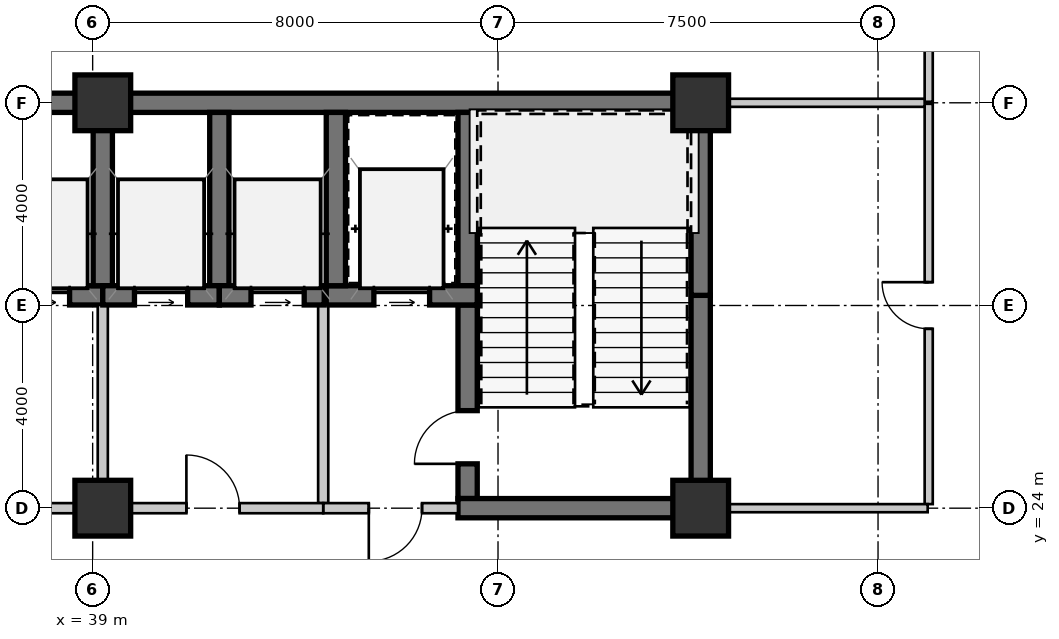
"""IFC4 building model, lengths in metres.
Left out: names, types, materials, properties, quantities, classifications, styles, units other than length and angle.
Written with IfcOpenShell. Run it as: python <this file> out.ifc"""

import sys

from ifc_helpers import new_model, si_unit, direction, frame, frame_2d, origin, origin_2d, place, context, subcontext, project, spatial, rectangle, extrude, source, transform, mapped, element, fill, save


model = new_model("IFC4")
c1 = context("Model", 3, precision=1e-05, world=origin(), true_north=direction((0.0, 1.0)))
c2 = subcontext(c1, "Body", "Model", "MODEL_VIEW")
j1 = project(units=[si_unit("LENGTHUNIT", "METRE"), si_unit("PLANEANGLEUNIT", "RADIAN")], contexts=[c1])
p1 = place(None, origin())
s1 = spatial("IfcSite", under=j1, at=p1, CompositionType="ELEMENT")
p2 = place(p1, origin())
s2 = spatial("IfcBuilding", under=s1, at=p2, CompositionType="ELEMENT")
p3 = place(p2, origin())
s3 = spatial("IfcBuildingStorey", under=s2, at=p3, CompositionType="ELEMENT", Elevation=0.0)
m1 = source(origin(), c2, "Body", "SweptSolid", [
    extrude(rectangle(XDim=1.1, YDim=1.1, at=origin_2d()), origin(), (0.0, 0.0, 1.0), 4.55),
])
for number, where, z_axis, x_axis in (
    (1, (39.2, 24.0, 0.0), (0.0, 0.0, 1.0), (1.0, 0.0, 0.0)),
    (2, (51.0, 24.0, 0.0), (0.0, 0.0, 1.0), (1.0, 0.0, 0.0)),
    (3, (39.2, 32.0, 0.0), (0.0, 0.0, 1.0), (1.0, 0.0, 0.0)),
    (4, (51.0, 32.0, 0.0), (0.0, 0.0, 1.0), (1.0, 0.0, 0.0)),
):
    element("IfcColumn", number, at=place(p3, frame(where, z_axis=z_axis, x_axis=x_axis)), inside=s3, PredefinedType="COLUMN", context=c2, shape_type="MappedRepresentation", body=[
        mapped(m1, transform((0.0, 0.0, 0.0), scale=1.0)),
    ])
m2 = source(origin(), c2, "Body", "SweptSolid", [
    extrude(rectangle(XDim=11.2, YDim=0.38, at=frame_2d((5.6, 0.0))), origin(), (0.0, 0.0, 1.0), 4.29),
])
p4 = place(p3, frame((28.0, 32.0, 0.0), z_axis=(0.0, 0.0, 1.0), x_axis=(1.0, 0.0, 0.0)))
e5 = element("IfcWall", 5, at=p4, inside=s3, PredefinedType="SHEAR", context=c2, shape_type="MappedRepresentation", body=[
    mapped(m2, transform((0.0, 0.0, 0.0), scale=1.0)),
])
m3 = source(origin(), c2, "Body", "SweptSolid", [
    extrude(rectangle(XDim=11.99, YDim=0.38, at=frame_2d((5.995, 0.0))), origin(), (0.0, 0.0, 1.0), 4.29),
])
p5 = place(p3, frame((39.2, 32.0, 0.0), z_axis=(0.0, 0.0, 1.0), x_axis=(1.0, 0.0, 0.0)))
e6 = element("IfcWall", 6, at=p5, inside=s3, PredefinedType="SHEAR", context=c2, shape_type="MappedRepresentation", body=[
    mapped(m3, transform((0.0, 0.0, 0.0), scale=1.0)),
])
m4 = source(origin(), c2, "Body", "SweptSolid", [
    extrude(rectangle(XDim=4.01, YDim=0.38, at=frame_2d((2.005, 0.0))), origin(), (0.0, 0.0, 1.0), 4.29),
])
p6 = place(p3, frame((51.0, 24.19, 0.0), z_axis=(0.0, 0.0, 1.0), x_axis=(0.0, 1.0, 0.0)))
e7 = element("IfcWall", 7, at=p6, inside=s3, PredefinedType="SHEAR", context=c2, shape_type="MappedRepresentation", body=[
    mapped(m4, transform((0.0, 0.0, 0.0), scale=1.0)),
])
m5 = source(origin(), c2, "Body", "SweptSolid", [
    extrude(rectangle(XDim=3.61, YDim=0.38, at=frame_2d((1.805, 0.0))), origin(), (0.0, 0.0, 1.0), 4.29),
])
p7 = place(p3, frame((51.0, 28.2, 0.0), z_axis=(0.0, 0.0, 1.0), x_axis=(0.0, 1.0, 0.0)))
e8 = element("IfcWall", 8, at=p7, inside=s3, PredefinedType="SHEAR", context=c2, shape_type="MappedRepresentation", body=[
    mapped(m5, transform((0.0, 0.0, 0.0), scale=1.0)),
])
m6 = source(origin(), c2, "Body", "SweptSolid", [
    extrude(rectangle(XDim=3.42, YDim=0.38, at=frame_2d((1.71, 0.0))), origin(), (0.0, 0.0, 1.0), 4.29),
])
p8 = place(p3, frame((46.4, 31.81, 0.0), z_axis=(0.0, 0.0, 1.0), x_axis=(0.0, -1.0, 0.0)))
e9 = element("IfcWall", 9, at=p8, inside=s3, PredefinedType="SHEAR", context=c2, shape_type="MappedRepresentation", body=[
    mapped(m6, transform((0.0, 0.0, 0.0), scale=1.0)),
])
m7 = source(origin(), c2, "Body", "SweptSolid", [
    extrude(rectangle(XDim=3.82, YDim=0.38, at=frame_2d((1.91, 0.0))), origin(), (0.0, 0.0, 1.0), 4.29),
])
p9 = place(p3, frame((46.4, 28.01, 0.0), z_axis=(0.0, 0.0, 1.0), x_axis=(0.0, -1.0, 0.0)))
e10 = element("IfcWall", 10, at=p9, inside=s3, PredefinedType="SHEAR", context=c2, shape_type="MappedRepresentation", body=[
    mapped(m7, transform((0.0, 0.0, 0.0), scale=1.0)),
])
m8 = source(origin(), c2, "Body", "SweptSolid", [
    extrude(rectangle(XDim=1.05, YDim=2.1, at=frame_2d((0.525, 1.05))), frame((0.0, 0.2, 0.0), z_axis=(0.0, -1.0, 0.0), x_axis=(1.0, 0.0, 0.0)), (0.0, 0.0, 1.0), 0.4),
])
p10 = place(p9, frame((2.085, 0.0, 0.0)))
e11 = element("IfcOpeningElement", 11, at=p10, cuts=e10, PredefinedType="OPENING", context=c2, shape_type="MappedRepresentation", body=[
    mapped(m8, transform((0.0, 0.0, 0.0), scale=1.0)),
])
m9 = source(origin(), c2, "Body", "SweptSolid", [
    extrude(rectangle(XDim=4.98, YDim=0.38, at=frame_2d((2.49, 0.0))), origin(), (0.0, 0.0, 1.0), 4.29),
])
p11 = place(p3, frame((46.21, 24.0, 0.0), z_axis=(0.0, 0.0, 1.0), x_axis=(1.0, 0.0, 0.0)))
e12 = element("IfcWall", 12, at=p11, inside=s3, PredefinedType="SHEAR", context=c2, shape_type="MappedRepresentation", body=[
    mapped(m9, transform((0.0, 0.0, 0.0), scale=1.0)),
])
m10 = source(origin(), c2, "Body", "SweptSolid", [
    extrude(rectangle(XDim=2.98, YDim=0.38, at=frame_2d((1.49, 0.0))), origin(), (0.0, 0.0, 1.0), 4.29),
])
p12 = place(p3, frame((43.61, 28.2, 0.0), z_axis=(0.0, 0.0, 1.0), x_axis=(1.0, 0.0, 0.0)))
e13 = element("IfcWall", 13, at=p12, inside=s3, PredefinedType="SHEAR", context=c2, shape_type="MappedRepresentation", body=[
    mapped(m10, transform((0.0, 0.0, 0.0), scale=1.0)),
])
m11 = source(origin(), c2, "Body", "SweptSolid", [
    extrude(rectangle(XDim=1.1, YDim=2.15, at=frame_2d((0.55, 1.075))), frame((0.0, 0.2, 0.0), z_axis=(0.0, -1.0, 0.0), x_axis=(1.0, 0.0, 0.0)), (0.0, 0.0, 1.0), 0.4),
])
p13 = place(p12, frame((0.94, 0.0, 0.0)))
e14 = element("IfcOpeningElement", 14, at=p13, cuts=e13, PredefinedType="OPENING", context=c2, shape_type="MappedRepresentation", body=[
    mapped(m11, transform((0.0, 0.0, 0.0), scale=1.0)),
])
p14 = place(p3, frame((43.8, 31.81, 0.0), z_axis=(0.0, 0.0, 1.0), x_axis=(0.0, -1.0, 0.0)))
e15 = element("IfcWall", 15, at=p14, inside=s3, PredefinedType="SHEAR", context=c2, shape_type="MappedRepresentation", body=[
    mapped(m6, transform((0.0, 0.0, 0.0), scale=1.0)),
])
m12 = source(origin(), c2, "Body", "SweptSolid", [
    extrude(rectangle(XDim=3.91, YDim=0.2, at=frame_2d((1.955, 0.0))), origin(), (0.0, 0.0, 1.0), 4.29),
])
p15 = place(p3, frame((43.55, 28.01, 0.0), z_axis=(0.0, 0.0, 1.0), x_axis=(0.0, -1.0, 0.0)))
e16 = element("IfcWall", 16, at=p15, inside=s3, PredefinedType="SOLIDWALL", context=c2, shape_type="MappedRepresentation", body=[
    mapped(m12, transform((0.0, 0.0, 0.0), scale=1.0)),
])
m13 = source(origin(), c2, "Body", "SweptSolid", [
    extrude(rectangle(XDim=2.66, YDim=0.2, at=frame_2d((1.33, 0.0))), origin(), (0.0, 0.0, 1.0), 3.757),
])
p16 = place(p3, frame((43.55, 24.0, 0.0), z_axis=(0.0, 0.0, 1.0), x_axis=(1.0, 0.0, 0.0)))
e17 = element("IfcWall", 17, at=p16, inside=s3, PredefinedType="SOLIDWALL", context=c2, shape_type="MappedRepresentation", body=[
    mapped(m13, transform((0.0, 0.0, 0.0), scale=1.0)),
])
m14 = source(origin(), c2, "Body", "SweptSolid", [
    extrude(rectangle(XDim=1.05, YDim=2.1, at=frame_2d((0.525, 1.05))), frame((0.0, 0.11, 0.0), z_axis=(0.0, -1.0, 0.0), x_axis=(1.0, 0.0, 0.0)), (0.0, 0.0, 1.0), 0.22),
])
p17 = place(p16, frame((0.9, 0.0, 0.0)))
e18 = element("IfcOpeningElement", 18, at=p17, cuts=e17, PredefinedType="OPENING", context=c2, shape_type="MappedRepresentation", body=[
    mapped(m14, transform((0.0, 0.0, 0.0), scale=1.0)),
])
m15 = source(origin(), c2, "Body", "SweptSolid", [
    extrude(rectangle(XDim=2.54, YDim=0.38, at=frame_2d((1.27, 0.0))), origin(), (0.0, 0.0, 1.0), 4.29),
])
p18 = place(p3, frame((36.66, 28.2, 0.0), z_axis=(0.0, 0.0, 1.0), x_axis=(1.0, 0.0, 0.0)))
e19 = element("IfcWall", 19, at=p18, inside=s3, PredefinedType="SHEAR", context=c2, shape_type="MappedRepresentation", body=[
    mapped(m15, transform((0.0, 0.0, 0.0), scale=1.0)),
])
m16 = source(origin(), c2, "Body", "SweptSolid", [
    extrude(rectangle(XDim=1.05, YDim=2.15, at=frame_2d((0.525, 1.075))), frame((0.0, 0.2, 0.0), z_axis=(0.0, -1.0, 0.0), x_axis=(1.0, 0.0, 0.0)), (0.0, 0.0, 1.0), 0.4),
])
p19 = place(p18, frame((0.835, 0.0, 0.0)))
e20 = element("IfcOpeningElement", 20, at=p19, cuts=e19, PredefinedType="OPENING", context=c2, shape_type="MappedRepresentation", body=[
    mapped(m16, transform((0.0, 0.0, 0.0), scale=1.0)),
])
p20 = place(p3, frame((39.2, 28.39, 0.0), z_axis=(0.0, 0.0, 1.0), x_axis=(0.0, 1.0, 0.0)))
e21 = element("IfcWall", 21, at=p20, inside=s3, PredefinedType="SHEAR", context=c2, shape_type="MappedRepresentation", body=[
    mapped(m6, transform((0.0, 0.0, 0.0), scale=1.0)),
])
m17 = source(origin(), c2, "Body", "SweptSolid", [
    extrude(rectangle(XDim=3.91, YDim=0.2, at=frame_2d((1.955, 0.0))), origin(), (0.0, 0.0, 1.0), 3.83),
])
p21 = place(p3, frame((39.2, 28.01, 0.0), z_axis=(0.0, 0.0, 1.0), x_axis=(0.0, -1.0, 0.0)))
e22 = element("IfcWall", 22, at=p21, inside=s3, PredefinedType="SOLIDWALL", context=c2, shape_type="MappedRepresentation", body=[
    mapped(m17, transform((0.0, 0.0, 0.0), scale=1.0)),
])
m18 = source(origin(), c2, "Body", "SweptSolid", [
    extrude(rectangle(XDim=6.35, YDim=0.2, at=frame_2d((3.175, 0.0))), origin(), (0.0, 0.0, 1.0), 3.83),
])
p22 = place(p3, frame((39.2, 24.0, 0.0), z_axis=(0.0, 0.0, 1.0), x_axis=(-1.0, 0.0, 0.0)))
e23 = element("IfcWall", 23, at=p22, inside=s3, PredefinedType="SOLIDWALL", context=c2, shape_type="MappedRepresentation", body=[
    mapped(m18, transform((0.0, 0.0, 0.0), scale=1.0)),
])
p23 = place(p22, frame((2.65, 0.0, 0.0)))
e24 = element("IfcOpeningElement", 24, at=p23, cuts=e23, PredefinedType="OPENING", context=c2, shape_type="MappedRepresentation", body=[
    mapped(m14, transform((0.0, 0.0, 0.0), scale=1.0)),
])
p24 = place(p3, frame((41.5, 28.39, 0.0), z_axis=(0.0, 0.0, 1.0), x_axis=(0.0, 1.0, 0.0)))
e25 = element("IfcWall", 25, at=p24, inside=s3, PredefinedType="SHEAR", context=c2, shape_type="MappedRepresentation", body=[
    mapped(m6, transform((0.0, 0.0, 0.0), scale=1.0)),
])
m19 = source(origin(), c2, "Body", "SweptSolid", [
    extrude(rectangle(XDim=2.3, YDim=0.38, at=frame_2d((1.15, 0.0))), origin(), (0.0, 0.0, 1.0), 4.29),
])
p25 = place(p3, frame((39.2, 28.2, 0.0), z_axis=(0.0, 0.0, 1.0), x_axis=(1.0, 0.0, 0.0)))
e26 = element("IfcWall", 26, at=p25, inside=s3, PredefinedType="SHEAR", context=c2, shape_type="MappedRepresentation", body=[
    mapped(m19, transform((0.0, 0.0, 0.0), scale=1.0)),
])
p26 = place(p25, frame((0.625, 0.0, 0.0)))
e27 = element("IfcOpeningElement", 27, at=p26, cuts=e26, PredefinedType="OPENING", context=c2, shape_type="MappedRepresentation", body=[
    mapped(m16, transform((0.0, 0.0, 0.0), scale=1.0)),
])
m20 = source(origin(), c2, "Body", "SweptSolid", [
    extrude(rectangle(XDim=2.07, YDim=0.38, at=frame_2d((1.035, 0.0))), origin(), (0.0, 0.0, 1.0), 4.29),
])
p27 = place(p3, frame((41.5, 28.2, 0.0), z_axis=(0.0, 0.0, 1.0), x_axis=(1.0, 0.0, 0.0)))
e28 = element("IfcWall", 28, at=p27, inside=s3, PredefinedType="SHEAR", context=c2, shape_type="MappedRepresentation", body=[
    mapped(m20, transform((0.0, 0.0, 0.0), scale=1.0)),
])
p28 = place(p27, frame((0.625, 0.0, 0.0)))
e29 = element("IfcOpeningElement", 29, at=p28, cuts=e28, PredefinedType="OPENING", context=c2, shape_type="MappedRepresentation", body=[
    mapped(m16, transform((0.0, 0.0, 0.0), scale=1.0)),
])
m21 = source(origin(), c2, "Body", "SweptSolid", [
    extrude(rectangle(XDim=4.35, YDim=0.2, at=frame_2d((2.175, 0.0))), origin(), (0.0, 0.0, 1.0), 3.757),
])
p29 = place(p3, frame((43.55, 24.0, 0.0), z_axis=(0.0, 0.0, 1.0), x_axis=(-1.0, 0.0, 0.0)))
e30 = element("IfcWall", 30, at=p29, inside=s3, PredefinedType="SOLIDWALL", context=c2, shape_type="MappedRepresentation", body=[
    mapped(m21, transform((0.0, 0.0, 0.0), scale=1.0)),
])
p30 = place(p29, frame((1.65, 0.0, 0.0)))
e31 = element("IfcOpeningElement", 31, at=p30, cuts=e30, PredefinedType="OPENING", context=c2, shape_type="MappedRepresentation", body=[
    mapped(m14, transform((0.0, 0.0, 0.0), scale=1.0)),
])
m22 = source(origin(), c2, "Body", "SweptSolid", [
    extrude(rectangle(XDim=7.9, YDim=0.16, at=frame_2d((3.95, 0.0))), origin(), (0.0, 0.0, 1.0), 4.29),
])
p31 = place(p3, frame((55.5, 24.08, 0.0), z_axis=(0.0, 0.0, 1.0), x_axis=(0.0, 1.0, 0.0)))
e32 = element("IfcWall", 32, at=p31, inside=s3, PredefinedType="PARTITIONING", context=c2, shape_type="MappedRepresentation", body=[
    mapped(m22, transform((0.0, 0.0, 0.0), scale=1.0)),
])
m23 = source(origin(), c2, "Body", "SweptSolid", [
    extrude(rectangle(XDim=0.92, YDim=2.1, at=frame_2d((0.46, 1.05))), frame((0.0, 0.09, 0.0), z_axis=(0.0, -1.0, 0.0), x_axis=(1.0, 0.0, 0.0)), (0.0, 0.0, 1.0), 0.18),
])
p32 = place(p31, frame((3.46, 0.0, 0.0)))
e33 = element("IfcOpeningElement", 33, at=p32, cuts=e32, PredefinedType="OPENING", context=c2, shape_type="MappedRepresentation", body=[
    mapped(m23, transform((0.0, 0.0, 0.0), scale=1.0)),
])
m24 = source(origin(), c2, "Body", "SweptSolid", [
    extrude(rectangle(XDim=4.29, YDim=0.16, at=frame_2d((2.145, 0.0))), origin(), (0.0, 0.0, 1.0), 4.29),
])
p33 = place(p3, frame((51.19, 24.0, 0.0), z_axis=(0.0, 0.0, 1.0), x_axis=(1.0, 0.0, 0.0)))
e34 = element("IfcWall", 34, at=p33, inside=s3, PredefinedType="PARTITIONING", context=c2, shape_type="MappedRepresentation", body=[
    mapped(m24, transform((0.0, 0.0, 0.0), scale=1.0)),
])
m25 = source(origin(), c2, "Body", "SweptSolid", [
    extrude(rectangle(XDim=3.9, YDim=0.16, at=frame_2d((1.95, 0.0))), origin(), (0.0, 0.0, 1.0), 4.29),
])
p34 = place(p3, frame((55.5, 32.02, 0.0), z_axis=(0.0, 0.0, 1.0), x_axis=(0.0, 1.0, 0.0)))
e35 = element("IfcWall", 35, at=p34, inside=s3, PredefinedType="PARTITIONING", context=c2, shape_type="MappedRepresentation", body=[
    mapped(m25, transform((0.0, 0.0, 0.0), scale=1.0)),
])
m26 = source(origin(), c2, "Body", "SweptSolid", [
    extrude(rectangle(XDim=4.23, YDim=0.16, at=frame_2d((2.115, 0.0))), origin(), (0.0, 0.0, 1.0), 3.757),
])
p35 = place(p3, frame((51.19, 32.0, 0.0), z_axis=(0.0, 0.0, 1.0), x_axis=(1.0, 0.0, 0.0)))
e36 = element("IfcWall", 36, at=p35, inside=s3, PredefinedType="PARTITIONING", context=c2, shape_type="MappedRepresentation", body=[
    mapped(m26, transform((0.0, 0.0, 0.0), scale=1.0)),
])
m27 = source(origin(), c2, "Body", "SweptSolid", [
    extrude(rectangle(XDim=1.05, YDim=2.1, at=frame_2d((0.525, 1.05))), frame((0.0, 0.025, 0.0), z_axis=(0.0, -1.0, 0.0), x_axis=(1.0, 0.0, 0.0)), (0.0, 0.0, 1.0), 0.05),
])
p36 = place(p10, frame((1.05, 0.0, 0.0), z_axis=(0.0, 0.0, 1.0), x_axis=(-1.0, 0.0, 0.0)))
e37 = element("IfcDoor", 37, at=p36, inside=s3, OperationType="SINGLE_SWING_LEFT", PredefinedType="DOOR", context=c2, shape_type="MappedRepresentation", body=[
    mapped(m27, transform((0.0, 0.0, 0.0), scale=1.0)),
])
fill(e11, e37)
m28 = source(origin(), c2, "Body", "SweptSolid", [
    extrude(rectangle(XDim=1.1, YDim=2.15, at=frame_2d((0.55, 1.075))), frame((0.0, 0.025, 0.0), z_axis=(0.0, -1.0, 0.0), x_axis=(1.0, 0.0, 0.0)), (0.0, 0.0, 1.0), 0.05),
])
p37 = place(p13, origin())
e38 = element("IfcDoor", 38, at=p37, inside=s3, OperationType="SLIDING_TO_LEFT", PredefinedType="DOOR", context=c2, shape_type="MappedRepresentation", body=[
    mapped(m28, transform((0.0, 0.0, 0.0), scale=1.0)),
])
fill(e14, e38)
p38 = place(p17, frame((1.05, 0.0, 0.0), z_axis=(0.0, 0.0, 1.0), x_axis=(-1.0, 0.0, 0.0)))
e39 = element("IfcDoor", 39, at=p38, inside=s3, OperationType="SINGLE_SWING_RIGHT", PredefinedType="DOOR", context=c2, shape_type="MappedRepresentation", body=[
    mapped(m27, transform((0.0, 0.0, 0.0), scale=1.0)),
])
fill(e18, e39)
m29 = source(origin(), c2, "Body", "SweptSolid", [
    extrude(rectangle(XDim=1.05, YDim=2.15, at=frame_2d((0.525, 1.075))), frame((0.0, 0.025, 0.0), z_axis=(0.0, -1.0, 0.0), x_axis=(1.0, 0.0, 0.0)), (0.0, 0.0, 1.0), 0.05),
])
p39 = place(p19, origin())
e40 = element("IfcDoor", 40, at=p39, inside=s3, OperationType="SLIDING_TO_LEFT", PredefinedType="DOOR", context=c2, shape_type="MappedRepresentation", body=[
    mapped(m29, transform((0.0, 0.0, 0.0), scale=1.0)),
])
fill(e20, e40)
p40 = place(p26, origin())
e41 = element("IfcDoor", 41, at=p40, inside=s3, OperationType="SLIDING_TO_LEFT", PredefinedType="DOOR", context=c2, shape_type="MappedRepresentation", body=[
    mapped(m29, transform((0.0, 0.0, 0.0), scale=1.0)),
])
fill(e27, e41)
p41 = place(p28, origin())
e42 = element("IfcDoor", 42, at=p41, inside=s3, OperationType="SLIDING_TO_LEFT", PredefinedType="DOOR", context=c2, shape_type="MappedRepresentation", body=[
    mapped(m29, transform((0.0, 0.0, 0.0), scale=1.0)),
])
fill(e29, e42)
p42 = place(p30, frame((1.05, 0.0, 0.0), z_axis=(0.0, 0.0, 1.0), x_axis=(-1.0, 0.0, 0.0)))
e43 = element("IfcDoor", 43, at=p42, inside=s3, OperationType="SINGLE_SWING_LEFT", PredefinedType="DOOR", context=c2, shape_type="MappedRepresentation", body=[
    mapped(m27, transform((0.0, 0.0, 0.0), scale=1.0)),
])
fill(e31, e43)
m30 = source(origin(), c2, "Body", "SweptSolid", [
    extrude(rectangle(XDim=0.92, YDim=2.1, at=frame_2d((0.46, 1.05))), frame((0.0, 0.025, 0.0), z_axis=(0.0, -1.0, 0.0), x_axis=(1.0, 0.0, 0.0)), (0.0, 0.0, 1.0), 0.05),
])
p43 = place(p32, origin())
e44 = element("IfcDoor", 44, at=p43, inside=s3, OperationType="SINGLE_SWING_RIGHT", PredefinedType="DOOR", context=c2, shape_type="MappedRepresentation", body=[
    mapped(m30, transform((0.0, 0.0, 0.0), scale=1.0)),
])
fill(e33, e44)
save(model, sys.argv[1])
